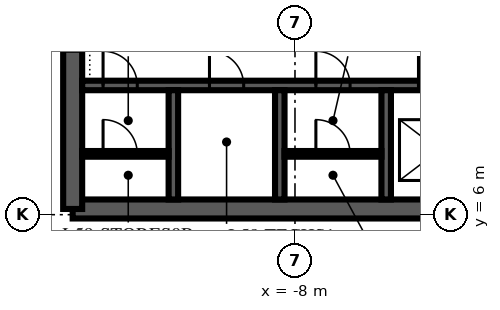
"""IFC4 building model, lengths in metres.
Left out: names, types, materials, properties, quantities, classifications, styles, units other than length and angle.
Written with IfcOpenShell. Run it as: python <this file> out.ifc"""

import sys

from ifc_helpers import new_model, si_unit, direction, frame, frame_2d, origin, place, context, subcontext, project, spatial, polyline, rectangle, outline, extrude, element, fill, save


model = new_model("IFC4")
c1 = context("Model", 3, precision=1e-05, world=origin(), true_north=direction((0.0, 1.0)))
c2 = subcontext(c1, "Body", "Model", "MODEL_VIEW")
j1 = project(units=[si_unit("LENGTHUNIT", "METRE"), si_unit("PLANEANGLEUNIT", "RADIAN")], contexts=[c1])
p1 = place(None, origin())
s1 = spatial("IfcSite", under=j1, at=p1, CompositionType="ELEMENT")
p2 = place(p1, origin())
s2 = spatial("IfcBuilding", under=s1, at=p2, CompositionType="ELEMENT")
p3 = place(p2, frame((0.0, 0.0, 256.0)))
s3 = spatial("IfcBuildingStorey", under=s2, at=p3, CompositionType="ELEMENT", Elevation=256.0)
p4 = place(p3, frame((-13.85, 6.15, 0.0), z_axis=(0.0, 0.0, 1.0), x_axis=(1.0, 0.0, 0.0)))
e1 = element("IfcWall", 1, at=p4, inside=s3, PredefinedType="SHEAR", context=c2, shape_type="SweptSolid", body=[
    extrude(rectangle(XDim=27.7, YDim=0.5, at=frame_2d((13.85, 0.0))), origin(), (0.0, 0.0, 1.0), 4.0),
])
p5 = place(p3, frame((-13.85, 23.85, 0.0), z_axis=(0.0, 0.0, 1.0), x_axis=(0.0, -1.0, 0.0)))
e2 = element("IfcWall", 2, at=p5, inside=s3, PredefinedType="SHEAR", context=c2, shape_type="SweptSolid", body=[
    extrude(outline(polyline([(0.0, -0.25), (17.7, -0.25), (17.7, 0.0), (17.45, 0.0), (17.45, 0.25), (0.25, 0.25), (0.25, 0.0), (0.0, 0.0), (0.0, -0.25)])), origin(), (0.0, 0.0, 1.0), 4.0),
])
p6 = place(p5, frame((11.75, 0.0, 0.0)))
e3 = element("IfcOpeningElement", 3, at=p6, cuts=e2, PredefinedType="OPENING", context=c2, shape_type="SweptSolid", body=[
    extrude(rectangle(XDim=1.8, YDim=2.4, at=frame_2d((0.9, 1.2))), frame((0.0, 0.265, 0.0), z_axis=(0.0, -1.0, 0.0), x_axis=(1.0, 0.0, 0.0)), (0.0, 0.0, 1.0), 0.53),
])
p7 = place(p3, frame((-13.6, 9.4, 0.0), z_axis=(0.0, 0.0, 1.0), x_axis=(1.0, 0.0, 0.0)))
e4 = element("IfcWall", 4, at=p7, inside=s3, PredefinedType="SHEAR", context=c2, shape_type="SweptSolid", body=[
    extrude(rectangle(XDim=27.2, YDim=0.25, at=frame_2d((13.6, 0.0))), origin(), (0.0, 0.0, 1.0), 4.0),
])
p8 = place(p7, frame((8.85, 0.0, 0.0)))
e5 = element("IfcOpeningElement", 5, at=p8, cuts=e4, PredefinedType="OPENING", context=c2, shape_type="SweptSolid", body=[
    extrude(rectangle(XDim=1.1, YDim=2.1, at=frame_2d((0.55, 1.05))), frame((0.0, 0.14, 0.0), z_axis=(0.0, -1.0, 0.0), x_axis=(1.0, 0.0, 0.0)), (0.0, 0.0, 1.0), 0.28),
])
p9 = place(p7, frame((11.65, 0.0, 0.0)))
e6 = element("IfcOpeningElement", 6, at=p9, cuts=e4, PredefinedType="OPENING", context=c2, shape_type="SweptSolid", body=[
    extrude(rectangle(XDim=1.1, YDim=2.1, at=frame_2d((0.55, 1.05))), frame((0.0, 0.14, 0.0), z_axis=(0.0, -1.0, 0.0), x_axis=(1.0, 0.0, 0.0)), (0.0, 0.0, 1.0), 0.28),
])
p10 = place(p7, frame((14.45, 0.0, 0.0)))
e7 = element("IfcOpeningElement", 7, at=p10, cuts=e4, PredefinedType="OPENING", context=c2, shape_type="SweptSolid", body=[
    extrude(rectangle(XDim=1.1, YDim=2.1, at=frame_2d((0.55, 1.05))), frame((0.0, 0.14, 0.0), z_axis=(0.0, -1.0, 0.0), x_axis=(1.0, 0.0, 0.0)), (0.0, 0.0, 1.0), 0.28),
])
p11 = place(p7, frame((0.55, 0.0, 0.0)))
e8 = element("IfcOpeningElement", 8, at=p11, cuts=e4, PredefinedType="OPENING", context=c2, shape_type="SweptSolid", body=[
    extrude(rectangle(XDim=0.9, YDim=2.1, at=frame_2d((0.45, 1.05))), frame((0.0, 0.14, 0.0), z_axis=(0.0, -1.0, 0.0), x_axis=(1.0, 0.0, 0.0)), (0.0, 0.0, 1.0), 0.28),
])
p12 = place(p7, frame((3.35, 0.0, 0.0)))
e9 = element("IfcOpeningElement", 9, at=p12, cuts=e4, PredefinedType="OPENING", context=c2, shape_type="SweptSolid", body=[
    extrude(rectangle(XDim=0.9, YDim=2.1, at=frame_2d((0.45, 1.05))), frame((0.0, 0.14, 0.0), z_axis=(0.0, -1.0, 0.0), x_axis=(1.0, 0.0, 0.0)), (0.0, 0.0, 1.0), 0.28),
])
p13 = place(p7, frame((6.15, 0.0, 0.0)))
e10 = element("IfcOpeningElement", 10, at=p13, cuts=e4, PredefinedType="OPENING", context=c2, shape_type="SweptSolid", body=[
    extrude(rectangle(XDim=0.9, YDim=2.1, at=frame_2d((0.45, 1.05))), frame((0.0, 0.14, 0.0), z_axis=(0.0, -1.0, 0.0), x_axis=(1.0, 0.0, 0.0)), (0.0, 0.0, 1.0), 0.28),
])
p14 = place(p7, frame((17.35, 0.0, 0.0)))
e11 = element("IfcOpeningElement", 11, at=p14, cuts=e4, PredefinedType="OPENING", context=c2, shape_type="SweptSolid", body=[
    extrude(rectangle(XDim=0.9, YDim=2.1, at=frame_2d((0.45, 1.05))), frame((0.0, 0.14, 0.0), z_axis=(0.0, -1.0, 0.0), x_axis=(1.0, 0.0, 0.0)), (0.0, 0.0, 1.0), 0.28),
])
p15 = place(p7, frame((20.15, 0.0, 0.0)))
e12 = element("IfcOpeningElement", 12, at=p15, cuts=e4, PredefinedType="OPENING", context=c2, shape_type="SweptSolid", body=[
    extrude(rectangle(XDim=0.9, YDim=2.1, at=frame_2d((0.45, 1.05))), frame((0.0, 0.14, 0.0), z_axis=(0.0, -1.0, 0.0), x_axis=(1.0, 0.0, 0.0)), (0.0, 0.0, 1.0), 0.28),
])
p16 = place(p7, frame((22.95, 0.0, 0.0)))
e13 = element("IfcOpeningElement", 13, at=p16, cuts=e4, PredefinedType="OPENING", context=c2, shape_type="SweptSolid", body=[
    extrude(rectangle(XDim=0.9, YDim=2.1, at=frame_2d((0.45, 1.05))), frame((0.0, 0.14, 0.0), z_axis=(0.0, -1.0, 0.0), x_axis=(1.0, 0.0, 0.0)), (0.0, 0.0, 1.0), 0.28),
])
for number, where, z_axis, x_axis in (
    (14, (-11.2, 6.4, 0.0), (0.0, 0.0, 1.0), (0.0, 1.0, 0.0)),
    (15, (-8.4, 6.4, 0.0), (0.0, 0.0, 1.0), (0.0, 1.0, 0.0)),
    (16, (-5.6, 6.4, 0.0), (0.0, 0.0, 1.0), (0.0, 1.0, 0.0)),
):
    element("IfcWall", number, at=place(p3, frame(where, z_axis=z_axis, x_axis=x_axis)), inside=s3, PredefinedType="SHEAR", context=c2, shape_type="SweptSolid", body=[
        extrude(rectangle(XDim=2.875, YDim=0.25, at=frame_2d((1.438, 0.0))), origin(), (0.0, 0.0, 1.0), 4.0),
    ])
p17 = place(p3, frame((-13.6, 7.6, 0.0), z_axis=(0.0, 0.0, 1.0), x_axis=(1.0, 0.0, 0.0)))
e17 = element("IfcWall", 17, at=p17, inside=s3, PredefinedType="PARTITIONING", context=c2, shape_type="SweptSolid", body=[
    extrude(rectangle(XDim=2.275, YDim=0.15, at=frame_2d((1.138, 0.0))), origin(), (0.0, 0.0, 1.0), 3.85),
])
p18 = place(p17, frame((0.55, 0.0, 0.0)))
e18 = element("IfcOpeningElement", 18, at=p18, cuts=e17, PredefinedType="OPENING", context=c2, shape_type="SweptSolid", body=[
    extrude(rectangle(XDim=0.9, YDim=2.1, at=frame_2d((0.45, 1.05))), frame((0.0, 0.09, 0.0), z_axis=(0.0, -1.0, 0.0), x_axis=(1.0, 0.0, 0.0)), (0.0, 0.0, 1.0), 0.18),
])
p19 = place(p3, frame((-8.275, 7.6, 0.0), z_axis=(0.0, 0.0, 1.0), x_axis=(1.0, 0.0, 0.0)))
e19 = element("IfcWall", 19, at=p19, inside=s3, PredefinedType="PARTITIONING", context=c2, shape_type="SweptSolid", body=[
    extrude(rectangle(XDim=2.55, YDim=0.15, at=frame_2d((1.275, 0.0))), origin(), (0.0, 0.0, 1.0), 3.85),
])
p20 = place(p19, frame((0.825, 0.0, 0.0)))
e20 = element("IfcOpeningElement", 20, at=p20, cuts=e19, PredefinedType="OPENING", context=c2, shape_type="SweptSolid", body=[
    extrude(rectangle(XDim=0.9, YDim=2.1, at=frame_2d((0.45, 1.05))), frame((0.0, 0.09, 0.0), z_axis=(0.0, -1.0, 0.0), x_axis=(1.0, 0.0, 0.0)), (0.0, 0.0, 1.0), 0.18),
])
p21 = place(p8, origin())
e21 = element("IfcDoor", 21, at=p21, inside=s3, OperationType="SLIDING_TO_LEFT", PredefinedType="DOOR", context=c2, shape_type="SweptSolid", body=[
    extrude(rectangle(XDim=1.1, YDim=2.1, at=frame_2d((0.55, 1.05))), frame((0.0, 0.125, 0.0), z_axis=(0.0, -1.0, 0.0), x_axis=(1.0, 0.0, 0.0)), (0.0, 0.0, 1.0), 0.25),
])
fill(e5, e21)
p22 = place(p11, origin())
e22 = element("IfcDoor", 22, at=p22, inside=s3, OperationType="SINGLE_SWING_LEFT", PredefinedType="DOOR", context=c2, shape_type="SweptSolid", body=[
    extrude(rectangle(XDim=0.9, YDim=2.1, at=frame_2d((0.45, 1.05))), frame((0.0, 0.125, 0.0), z_axis=(0.0, -1.0, 0.0), x_axis=(1.0, 0.0, 0.0)), (0.0, 0.0, 1.0), 0.25),
])
fill(e8, e22)
p23 = place(p18, origin())
e23 = element("IfcDoor", 23, at=p23, inside=s3, OperationType="SINGLE_SWING_LEFT", PredefinedType="DOOR", context=c2, shape_type="SweptSolid", body=[
    extrude(rectangle(XDim=0.9, YDim=2.1, at=frame_2d((0.45, 1.05))), frame((0.0, 0.075, 0.0), z_axis=(0.0, -1.0, 0.0), x_axis=(1.0, 0.0, 0.0)), (0.0, 0.0, 1.0), 0.149),
])
fill(e18, e23)
p24 = place(p12, origin())
e24 = element("IfcDoor", 24, at=p24, inside=s3, OperationType="SINGLE_SWING_LEFT", PredefinedType="DOOR", context=c2, shape_type="SweptSolid", body=[
    extrude(rectangle(XDim=0.9, YDim=2.1, at=frame_2d((0.45, 1.05))), frame((0.0, 0.125, 0.0), z_axis=(0.0, -1.0, 0.0), x_axis=(1.0, 0.0, 0.0)), (0.0, 0.0, 1.0), 0.25),
])
fill(e9, e24)
p25 = place(p13, origin())
e25 = element("IfcDoor", 25, at=p25, inside=s3, OperationType="SINGLE_SWING_LEFT", PredefinedType="DOOR", context=c2, shape_type="SweptSolid", body=[
    extrude(rectangle(XDim=0.9, YDim=2.1, at=frame_2d((0.45, 1.05))), frame((0.0, 0.125, 0.0), z_axis=(0.0, -1.0, 0.0), x_axis=(1.0, 0.0, 0.0)), (0.0, 0.0, 1.0), 0.25),
])
fill(e10, e25)
p26 = place(p20, origin())
e26 = element("IfcDoor", 26, at=p26, inside=s3, OperationType="SINGLE_SWING_LEFT", PredefinedType="DOOR", context=c2, shape_type="SweptSolid", body=[
    extrude(rectangle(XDim=0.9, YDim=2.1, at=frame_2d((0.45, 1.05))), frame((0.0, 0.075, 0.0), z_axis=(0.0, -1.0, 0.0), x_axis=(1.0, 0.0, 0.0)), (0.0, 0.0, 1.0), 0.149),
])
fill(e20, e26)
save(model, sys.argv[1])
